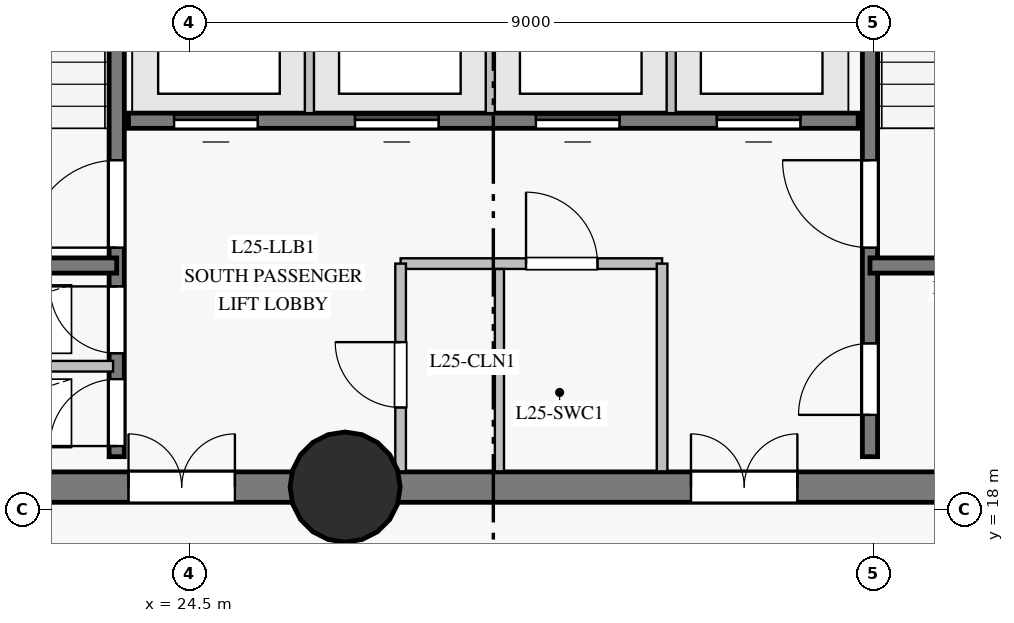
"""IFC4 building model, lengths in metres.
Left out: names, types, materials, properties, quantities, classifications, styles, units other than length and angle.
Written with IfcOpenShell. Run it as: python <this file> out.ifc"""

import sys

from ifc_helpers import new_model, si_unit, direction, frame, frame_2d, origin, origin_with_axes, origin_2d, place, context, subcontext, project, spatial, rectangle, circle, extrude, source, transform, mapped, element, fill, save


model = new_model("IFC4")
c1 = context("Model", 3, precision=1e-05, world=origin(), true_north=direction((0.0, 1.0)))
c2 = subcontext(c1, "Body", "Model", "MODEL_VIEW")
j1 = project(units=[si_unit("LENGTHUNIT", "METRE"), si_unit("PLANEANGLEUNIT", "RADIAN")], contexts=[c1])
p1 = place(None, origin())
s1 = spatial("IfcSite", under=j1, at=p1, CompositionType="ELEMENT")
p2 = place(p1, origin())
s2 = spatial("IfcBuilding", under=s1, at=p2, CompositionType="ELEMENT")
p3 = place(p2, frame((0.0, 0.0, 96.2)))
s3 = spatial("IfcBuildingStorey", under=s2, at=p3, CompositionType="ELEMENT", Elevation=96.2)
p4 = place(p3, frame((19.5, 18.3, 0.0), z_axis=(0.0, 0.0, 1.0), x_axis=(1.0, 0.0, 0.0)))
e1 = element("IfcWall", 1, at=p4, inside=s3, PredefinedType="SHEAR", context=c2, shape_type="SweptSolid", body=[
    extrude(rectangle(XDim=7.05, YDim=0.4, at=frame_2d((3.525, 0.0))), origin(), (0.0, 0.0, 1.0), 2.825),
])
p5 = place(p4, frame((4.2, 0.0, 0.0)))
e2 = element("IfcOpeningElement", 2, at=p5, cuts=e1, PredefinedType="OPENING", context=c2, shape_type="SweptSolid", body=[
    extrude(rectangle(XDim=1.4, YDim=2.2, at=frame_2d((0.7, 1.1))), frame((0.0, 0.21, 0.0), z_axis=(0.0, -1.0, 0.0), x_axis=(1.0, 0.0, 0.0)), (0.0, 0.0, 1.0), 0.42),
])
p6 = place(p3, frame((26.55, 18.3, 0.0), z_axis=(0.0, 0.0, 1.0), x_axis=(1.0, 0.0, 0.0)))
e3 = element("IfcWall", 3, at=p6, inside=s3, PredefinedType="SHEAR", context=c2, shape_type="SweptSolid", body=[
    extrude(rectangle(XDim=10.95, YDim=0.4, at=frame_2d((5.475, 0.0))), origin(), (0.0, 0.0, 1.0), 2.825),
])
p7 = place(p6, frame((4.55, 0.0, 0.0)))
e4 = element("IfcOpeningElement", 4, at=p7, cuts=e3, PredefinedType="OPENING", context=c2, shape_type="SweptSolid", body=[
    extrude(rectangle(XDim=1.4, YDim=2.2, at=frame_2d((0.7, 1.1))), frame((0.0, 0.21, 0.0), z_axis=(0.0, -1.0, 0.0), x_axis=(1.0, 0.0, 0.0)), (0.0, 0.0, 1.0), 0.42),
])
m1 = source(origin_with_axes(), c2, "Body", "SweptSolid", [
    extrude(circle(Radius=0.725, at=origin_2d()), origin(), (0.0, 0.0, 1.0), 3.05),
])
p8 = place(p3, frame((26.55, 18.3, 0.0), z_axis=(0.0, 0.0, 1.0), x_axis=(1.0, 0.0, 0.0)))
e5 = element("IfcColumn", 5, at=p8, inside=s3, PredefinedType="COLUMN", context=c2, shape_type="MappedRepresentation", body=[
    mapped(m1, transform((0.0, 0.0, 0.0), scale=1.0)),
])
p9 = place(p3, frame((23.545, 18.7, 0.0), z_axis=(0.0, 0.0, 1.0), x_axis=(0.0, 1.0, 0.0)))
e6 = element("IfcWall", 6, at=p9, inside=s3, PredefinedType="SHEAR", context=c2, shape_type="SweptSolid", body=[
    extrude(rectangle(XDim=15.6, YDim=0.2, at=frame_2d((7.8, 0.0))), origin(), (0.0, 0.0, 1.0), 2.825),
])
p10 = place(p9, frame((2.75, 0.0, 0.0)))
e7 = element("IfcOpeningElement", 7, at=p10, cuts=e6, PredefinedType="OPENING", context=c2, shape_type="SweptSolid", body=[
    extrude(rectangle(XDim=1.15, YDim=2.15, at=frame_2d((0.575, 1.075))), frame((0.0, 0.11, 0.0), z_axis=(0.0, -1.0, 0.0), x_axis=(1.0, 0.0, 0.0)), (0.0, 0.0, 1.0), 0.22),
])
p11 = place(p9, frame((0.14, 0.0, 0.0)))
e8 = element("IfcOpeningElement", 8, at=p11, cuts=e6, PredefinedType="OPENING", context=c2, shape_type="SweptSolid", body=[
    extrude(rectangle(XDim=0.88, YDim=2.1, at=frame_2d((0.44, 1.05))), frame((0.0, 0.11, 0.0), z_axis=(0.0, -1.0, 0.0), x_axis=(1.0, 0.0, 0.0)), (0.0, 0.0, 1.0), 0.22),
])
p12 = place(p9, frame((1.36, 0.0, 0.0)))
e9 = element("IfcOpeningElement", 9, at=p12, cuts=e6, PredefinedType="OPENING", context=c2, shape_type="SweptSolid", body=[
    extrude(rectangle(XDim=0.88, YDim=2.1, at=frame_2d((0.44, 1.05))), frame((0.0, 0.11, 0.0), z_axis=(0.0, -1.0, 0.0), x_axis=(1.0, 0.0, 0.0)), (0.0, 0.0, 1.0), 0.22),
])
p13 = place(p9, frame((12.1, 0.0, 0.0)))
e10 = element("IfcOpeningElement", 10, at=p13, cuts=e6, PredefinedType="OPENING", context=c2, shape_type="SweptSolid", body=[
    extrude(rectangle(XDim=1.12, YDim=2.15, at=frame_2d((0.56, 1.075))), frame((0.0, 0.11, 0.0), z_axis=(0.0, -1.0, 0.0), x_axis=(1.0, 0.0, 0.0)), (0.0, 0.0, 1.0), 0.22),
])
p14 = place(p9, frame((14.05, 0.0, 0.0)))
e11 = element("IfcOpeningElement", 11, at=p14, cuts=e6, PredefinedType="OPENING", context=c2, shape_type="SweptSolid", body=[
    extrude(rectangle(XDim=1.12, YDim=2.15, at=frame_2d((0.56, 1.075))), frame((0.0, 0.11, 0.0), z_axis=(0.0, -1.0, 0.0), x_axis=(1.0, 0.0, 0.0)), (0.0, 0.0, 1.0), 0.22),
])
p15 = place(p3, frame((33.455, 18.7, 0.0), z_axis=(0.0, 0.0, 1.0), x_axis=(0.0, 1.0, 0.0)))
e12 = element("IfcWall", 12, at=p15, inside=s3, PredefinedType="SHEAR", context=c2, shape_type="SweptSolid", body=[
    extrude(rectangle(XDim=15.6, YDim=0.2, at=frame_2d((7.8, 0.0))), origin(), (0.0, 0.0, 1.0), 2.825),
])
p16 = place(p15, frame((2.75, 0.0, 0.0)))
e13 = element("IfcOpeningElement", 13, at=p16, cuts=e12, PredefinedType="OPENING", context=c2, shape_type="SweptSolid", body=[
    extrude(rectangle(XDim=1.15, YDim=2.15, at=frame_2d((0.575, 1.075))), frame((0.0, 0.11, 0.0), z_axis=(0.0, -1.0, 0.0), x_axis=(1.0, 0.0, 0.0)), (0.0, 0.0, 1.0), 0.22),
])
p17 = place(p15, frame((0.55, 0.0, 0.0)))
e14 = element("IfcOpeningElement", 14, at=p17, cuts=e12, PredefinedType="OPENING", context=c2, shape_type="SweptSolid", body=[
    extrude(rectangle(XDim=0.94, YDim=2.1, at=frame_2d((0.47, 1.05))), frame((0.0, 0.11, 0.0), z_axis=(0.0, -1.0, 0.0), x_axis=(1.0, 0.0, 0.0)), (0.0, 0.0, 1.0), 0.22),
])
p18 = place(p3, frame((23.7, 23.12, 0.0), z_axis=(0.0, 0.0, 1.0), x_axis=(1.0, 0.0, 0.0)))
e15 = element("IfcWall", 15, at=p18, inside=s3, PredefinedType="SHEAR", context=c2, shape_type="SweptSolid", body=[
    extrude(rectangle(XDim=9.6, YDim=0.2, at=frame_2d((4.8, 0.0))), origin(), (0.0, 0.0, 1.0), 2.825),
])
p19 = place(p18, frame((0.6, 0.0, 0.0)))
e16 = element("IfcOpeningElement", 16, at=p19, cuts=e15, PredefinedType="OPENING", context=c2, shape_type="SweptSolid", body=[
    extrude(rectangle(XDim=1.1, YDim=2.15, at=frame_2d((0.55, 1.075))), frame((0.0, 0.11, 0.0), z_axis=(0.0, -1.0, 0.0), x_axis=(1.0, 0.0, 0.0)), (0.0, 0.0, 1.0), 0.22),
])
p20 = place(p18, frame((2.98, 0.0, 0.0)))
e17 = element("IfcOpeningElement", 17, at=p20, cuts=e15, PredefinedType="OPENING", context=c2, shape_type="SweptSolid", body=[
    extrude(rectangle(XDim=1.1, YDim=2.15, at=frame_2d((0.55, 1.075))), frame((0.0, 0.11, 0.0), z_axis=(0.0, -1.0, 0.0), x_axis=(1.0, 0.0, 0.0)), (0.0, 0.0, 1.0), 0.22),
])
p21 = place(p18, frame((5.36, 0.0, 0.0)))
e18 = element("IfcOpeningElement", 18, at=p21, cuts=e15, PredefinedType="OPENING", context=c2, shape_type="SweptSolid", body=[
    extrude(rectangle(XDim=1.1, YDim=2.15, at=frame_2d((0.55, 1.075))), frame((0.0, 0.11, 0.0), z_axis=(0.0, -1.0, 0.0), x_axis=(1.0, 0.0, 0.0)), (0.0, 0.0, 1.0), 0.22),
])
p22 = place(p18, frame((7.74, 0.0, 0.0)))
e19 = element("IfcOpeningElement", 19, at=p22, cuts=e15, PredefinedType="OPENING", context=c2, shape_type="SweptSolid", body=[
    extrude(rectangle(XDim=1.1, YDim=2.15, at=frame_2d((0.55, 1.075))), frame((0.0, 0.11, 0.0), z_axis=(0.0, -1.0, 0.0), x_axis=(1.0, 0.0, 0.0)), (0.0, 0.0, 1.0), 0.22),
])
for number, where, z_axis, x_axis in (
    (20, (33.455, 21.215, 0.0), (0.0, 0.0, 1.0), (1.0, 0.0, 0.0)),
    (21, (19.55, 21.215, 0.0), (0.0, 0.0, 1.0), (1.0, 0.0, 0.0)),
):
    element("IfcWall", number, at=place(p3, frame(where, z_axis=z_axis, x_axis=x_axis)), inside=s3, PredefinedType="SHEAR", context=c2, shape_type="SweptSolid", body=[
        extrude(rectangle(XDim=3.995, YDim=0.2, at=frame_2d((1.998, 0.0))), origin(), (0.0, 0.0, 1.0), 2.825),
    ])
p23 = place(p3, frame((19.707, 19.89, 0.0), z_axis=(0.0, 0.0, 1.0), x_axis=(1.0, 0.0, 0.0)))
e22 = element("IfcWall", 22, at=p23, inside=s3, PredefinedType="PARTITIONING", context=c2, shape_type="SweptSolid", body=[
    extrude(rectangle(XDim=3.79, YDim=0.14, at=frame_2d((1.895, 0.0))), origin(), (0.0, 0.0, 1.0), 2.825),
])
p24 = place(p3, frame((27.28, 21.24, 0.0), z_axis=(0.0, 0.0, 1.0), x_axis=(1.0, 0.0, 0.0)))
e23 = element("IfcWall", 23, at=p24, inside=s3, PredefinedType="PARTITIONING", context=c2, shape_type="SweptSolid", body=[
    extrude(rectangle(XDim=3.44, YDim=0.14, at=frame_2d((1.72, 0.0))), origin(), (0.0, 0.0, 1.0), 2.825),
])
p25 = place(p24, frame((1.65, 0.0, 0.0)))
e24 = element("IfcOpeningElement", 24, at=p25, cuts=e23, PredefinedType="OPENING", context=c2, shape_type="SweptSolid", body=[
    extrude(rectangle(XDim=0.94, YDim=2.1, at=frame_2d((0.47, 1.05))), frame((0.0, 0.08, 0.0), z_axis=(0.0, -1.0, 0.0), x_axis=(1.0, 0.0, 0.0)), (0.0, 0.0, 1.0), 0.16),
])
p26 = place(p3, frame((27.28, 18.507, 0.0), z_axis=(0.0, 0.0, 1.0), x_axis=(0.0, 1.0, 0.0)))
e25 = element("IfcWall", 25, at=p26, inside=s3, PredefinedType="PARTITIONING", context=c2, shape_type="SweptSolid", body=[
    extrude(rectangle(XDim=2.733, YDim=0.14, at=frame_2d((1.366, 0.0))), origin(), (0.0, 0.0, 1.0), 2.825),
])
p27 = place(p26, frame((0.84, 0.0, 0.0)))
e26 = element("IfcOpeningElement", 26, at=p27, cuts=e25, PredefinedType="OPENING", context=c2, shape_type="SweptSolid", body=[
    extrude(rectangle(XDim=0.86, YDim=2.1, at=frame_2d((0.43, 1.05))), frame((0.0, 0.08, 0.0), z_axis=(0.0, -1.0, 0.0), x_axis=(1.0, 0.0, 0.0)), (0.0, 0.0, 1.0), 0.16),
])
p28 = place(p3, frame((30.72, 18.507, 0.0), z_axis=(0.0, 0.0, 1.0), x_axis=(0.0, 1.0, 0.0)))
e27 = element("IfcWall", 27, at=p28, inside=s3, PredefinedType="PARTITIONING", context=c2, shape_type="SweptSolid", body=[
    extrude(rectangle(XDim=2.733, YDim=0.14, at=frame_2d((1.366, 0.0))), origin(), (0.0, 0.0, 1.0), 2.825),
])
for number, where, z_axis, x_axis in (
    (28, (26.08, 23.22, 0.0), (0.0, 0.0, 1.0), (0.0, 1.0, 0.0)),
    (29, (28.46, 23.22, 0.0), (0.0, 0.0, 1.0), (0.0, 1.0, 0.0)),
    (30, (30.84, 23.22, 0.0), (0.0, 0.0, 1.0), (0.0, 1.0, 0.0)),
):
    element("IfcWall", number, at=place(p3, frame(where, z_axis=z_axis, x_axis=x_axis)), inside=s3, PredefinedType="PARTITIONING", context=c2, shape_type="SweptSolid", body=[
        extrude(rectangle(XDim=2.6, YDim=0.12, at=frame_2d((1.3, 0.0))), origin(), (0.0, 0.0, 1.0), 2.825),
    ])
p29 = place(p3, frame((28.58, 18.507, 0.0), z_axis=(0.0, 0.0, 1.0), x_axis=(0.0, 1.0, 0.0)))
e31 = element("IfcWall", 31, at=p29, inside=s3, PredefinedType="PARTITIONING", context=c2, shape_type="SweptSolid", body=[
    extrude(rectangle(XDim=2.662, YDim=0.12, at=frame_2d((1.331, 0.0))), origin(), (0.0, 0.0, 1.0), 2.825),
])
m2 = source(origin_with_axes(), c2, "Body", "SweptSolid", [
    extrude(rectangle(XDim=1.15, YDim=2.15, at=frame_2d((0.575, 1.075))), frame((0.0, 0.025, 0.0), z_axis=(0.0, -1.0, 0.0), x_axis=(1.0, 0.0, 0.0)), (0.0, 0.0, 1.0), 0.05),
])
p30 = place(p10, origin())
e32 = element("IfcDoor", 32, at=p30, inside=s3, OperationType="SINGLE_SWING_LEFT", PredefinedType="DOOR", context=c2, shape_type="MappedRepresentation", body=[
    mapped(m2, transform((0.0, 0.0, 0.0), scale=1.0)),
])
fill(e7, e32)
p31 = place(p16, origin())
e33 = element("IfcDoor", 33, at=p31, inside=s3, OperationType="SINGLE_SWING_RIGHT", PredefinedType="DOOR", context=c2, shape_type="MappedRepresentation", body=[
    mapped(m2, transform((0.0, 0.0, 0.0), scale=1.0)),
])
fill(e13, e33)
m3 = source(origin_with_axes(), c2, "Body", "SweptSolid", [
    extrude(rectangle(XDim=0.88, YDim=2.1, at=frame_2d((0.44, 1.05))), frame((0.0, 0.025, 0.0), z_axis=(0.0, -1.0, 0.0), x_axis=(1.0, 0.0, 0.0)), (0.0, 0.0, 1.0), 0.05),
])
p32 = place(p11, origin())
e34 = element("IfcDoor", 34, at=p32, inside=s3, OperationType="SINGLE_SWING_LEFT", PredefinedType="DOOR", context=c2, shape_type="MappedRepresentation", body=[
    mapped(m3, transform((0.0, 0.0, 0.0), scale=1.0)),
])
fill(e8, e34)
p33 = place(p12, origin())
e35 = element("IfcDoor", 35, at=p33, inside=s3, OperationType="SINGLE_SWING_RIGHT", PredefinedType="DOOR", context=c2, shape_type="MappedRepresentation", body=[
    mapped(m3, transform((0.0, 0.0, 0.0), scale=1.0)),
])
fill(e9, e35)
m4 = source(origin_with_axes(), c2, "Body", "SweptSolid", [
    extrude(rectangle(XDim=1.4, YDim=2.2, at=frame_2d((0.7, 1.1))), frame((0.0, 0.025, 0.0), z_axis=(0.0, -1.0, 0.0), x_axis=(1.0, 0.0, 0.0)), (0.0, 0.0, 1.0), 0.05),
])
p34 = place(p5, origin())
e36 = element("IfcDoor", 36, at=p34, inside=s3, OperationType="DOUBLE_DOOR_SINGLE_SWING", PredefinedType="DOOR", context=c2, shape_type="MappedRepresentation", body=[
    mapped(m4, transform((0.0, 0.0, 0.0), scale=1.0)),
])
fill(e2, e36)
p35 = place(p7, origin())
e37 = element("IfcDoor", 37, at=p35, inside=s3, OperationType="DOUBLE_DOOR_SINGLE_SWING", PredefinedType="DOOR", context=c2, shape_type="MappedRepresentation", body=[
    mapped(m4, transform((0.0, 0.0, 0.0), scale=1.0)),
])
fill(e4, e37)
m5 = source(origin_with_axes(), c2, "Body", "SweptSolid", [
    extrude(rectangle(XDim=0.94, YDim=2.1, at=frame_2d((0.47, 1.05))), frame((0.0, 0.025, 0.0), z_axis=(0.0, -1.0, 0.0), x_axis=(1.0, 0.0, 0.0)), (0.0, 0.0, 1.0), 0.05),
])
p36 = place(p17, origin())
e38 = element("IfcDoor", 38, at=p36, inside=s3, OperationType="SINGLE_SWING_LEFT", PredefinedType="DOOR", context=c2, shape_type="MappedRepresentation", body=[
    mapped(m5, transform((0.0, 0.0, 0.0), scale=1.0)),
])
fill(e14, e38)
m6 = source(origin_with_axes(), c2, "Body", "SweptSolid", [
    extrude(rectangle(XDim=0.86, YDim=2.1, at=frame_2d((0.43, 1.05))), frame((0.0, 0.025, 0.0), z_axis=(0.0, -1.0, 0.0), x_axis=(1.0, 0.0, 0.0)), (0.0, 0.0, 1.0), 0.05),
])
p37 = place(p27, origin())
e39 = element("IfcDoor", 39, at=p37, inside=s3, OperationType="SINGLE_SWING_RIGHT", PredefinedType="DOOR", context=c2, shape_type="MappedRepresentation", body=[
    mapped(m6, transform((0.0, 0.0, 0.0), scale=1.0)),
])
fill(e26, e39)
p38 = place(p25, origin())
e40 = element("IfcDoor", 40, at=p38, inside=s3, OperationType="SINGLE_SWING_LEFT", PredefinedType="DOOR", context=c2, shape_type="MappedRepresentation", body=[
    mapped(m5, transform((0.0, 0.0, 0.0), scale=1.0)),
])
fill(e24, e40)
m7 = source(origin_with_axes(), c2, "Body", "SweptSolid", [
    extrude(rectangle(XDim=1.1, YDim=2.15, at=frame_2d((0.55, 1.075))), frame((0.0, 0.025, 0.0), z_axis=(0.0, -1.0, 0.0), x_axis=(1.0, 0.0, 0.0)), (0.0, 0.0, 1.0), 0.05),
])
p39 = place(p19, origin())
e41 = element("IfcDoor", 41, at=p39, inside=s3, OperationType="SLIDING_TO_LEFT", PredefinedType="DOOR", context=c2, shape_type="MappedRepresentation", body=[
    mapped(m7, transform((0.0, 0.0, 0.0), scale=1.0)),
])
fill(e16, e41)
p40 = place(p20, origin())
e42 = element("IfcDoor", 42, at=p40, inside=s3, OperationType="SLIDING_TO_RIGHT", PredefinedType="DOOR", context=c2, shape_type="MappedRepresentation", body=[
    mapped(m7, transform((0.0, 0.0, 0.0), scale=1.0)),
])
fill(e17, e42)
p41 = place(p21, origin())
e43 = element("IfcDoor", 43, at=p41, inside=s3, OperationType="SLIDING_TO_LEFT", PredefinedType="DOOR", context=c2, shape_type="MappedRepresentation", body=[
    mapped(m7, transform((0.0, 0.0, 0.0), scale=1.0)),
])
fill(e18, e43)
p42 = place(p22, origin())
e44 = element("IfcDoor", 44, at=p42, inside=s3, OperationType="SLIDING_TO_RIGHT", PredefinedType="DOOR", context=c2, shape_type="MappedRepresentation", body=[
    mapped(m7, transform((0.0, 0.0, 0.0), scale=1.0)),
])
fill(e19, e44)
save(model, sys.argv[1])
